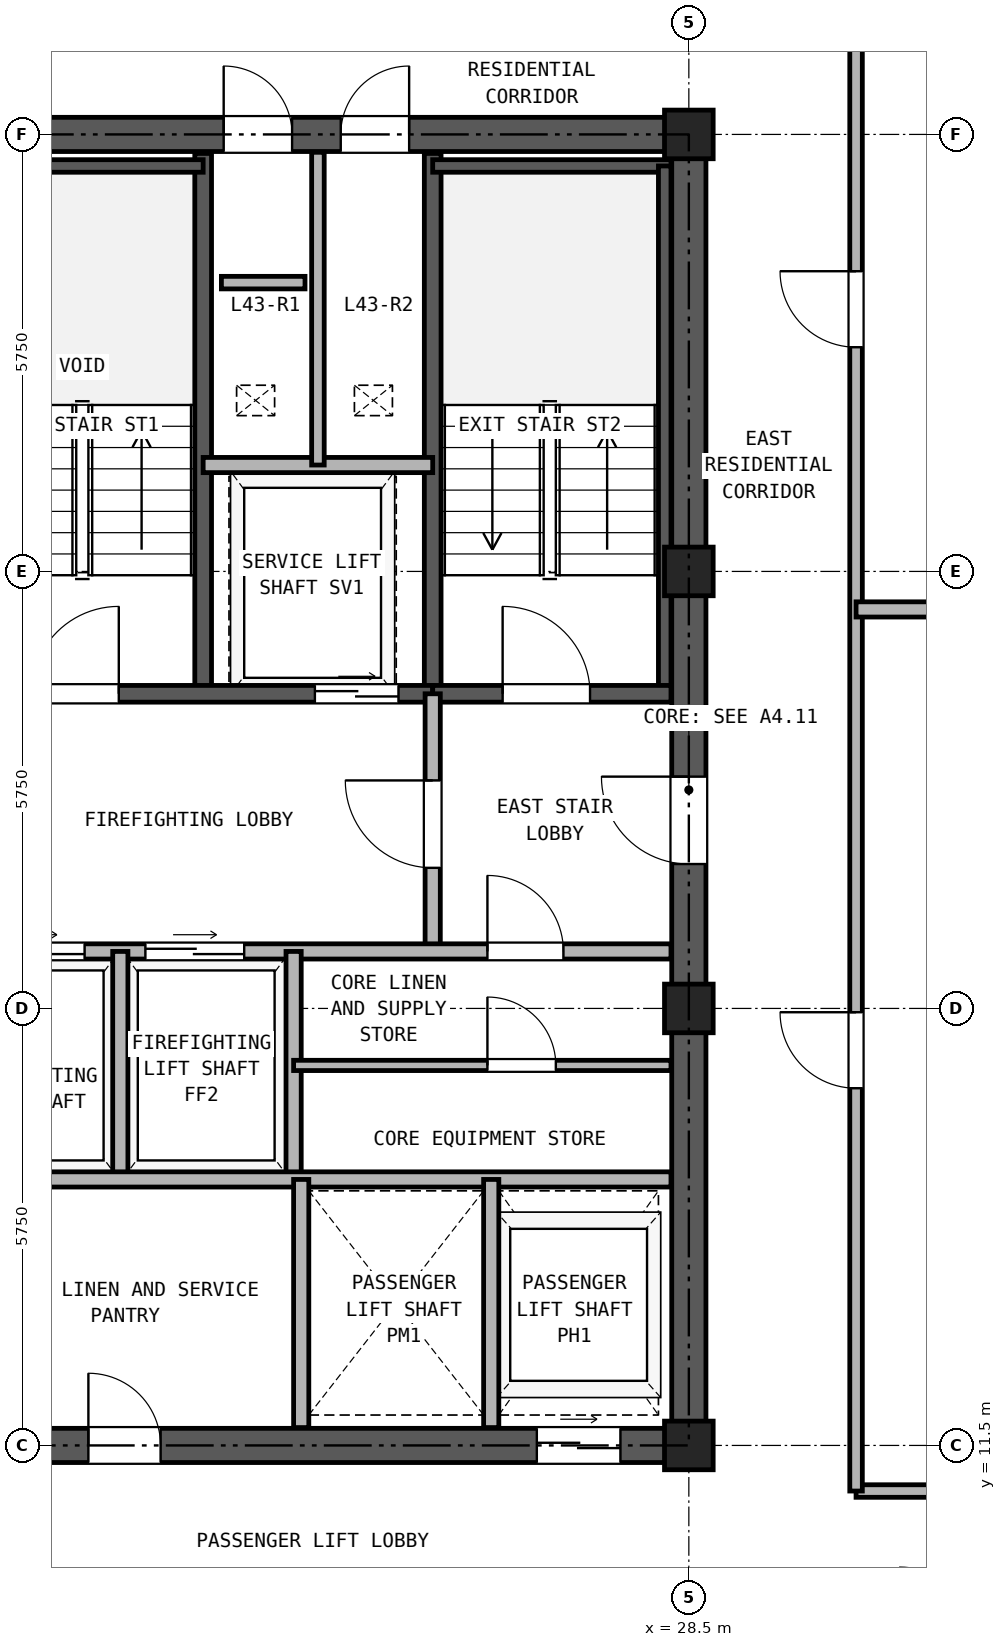
"""IFC4 building model, lengths in metres.
Left out: names, types, materials, properties, quantities, classifications, styles, units other than length and angle.
Written with IfcOpenShell. Run it as: python <this file> out.ifc"""

import sys

from ifc_helpers import new_model, si_unit, direction, frame, frame_2d, origin, origin_2d, place, context, subcontext, project, spatial, rectangle, hollow_rectangle, extrude, source, transform, mapped, element, fill, save


model = new_model("IFC4")
c1 = context("Model", 3, precision=1e-05, world=origin(), true_north=direction((0.0, 1.0)))
c2 = subcontext(c1, "Body", "Model", "MODEL_VIEW")
j1 = project(units=[si_unit("LENGTHUNIT", "METRE"), si_unit("PLANEANGLEUNIT", "RADIAN")], contexts=[c1])
p1 = place(None, origin())
s1 = spatial("IfcSite", under=j1, at=p1, CompositionType="ELEMENT")
p2 = place(p1, origin())
s2 = spatial("IfcBuilding", under=s1, at=p2, CompositionType="ELEMENT")
p3 = place(p2, frame((0.0, 0.0, 156.1)))
s3 = spatial("IfcBuildingStorey", under=s2, at=p3, CompositionType="ELEMENT", Elevation=156.1)
m1 = source(origin(), c2, "Body", "SweptSolid", [
    extrude(hollow_rectangle(XDim=0.64, YDim=0.64, WallThickness=0.035, at=origin_2d()), origin(), (0.0, 0.0, 1.0), 2.95),
])
for number, where, z_axis, x_axis in (
    (1, (28.5, 11.5, 0.0), (0.0, 0.0, 1.0), (1.0, 0.0, 0.0)),
    (2, (28.5, 17.25, 0.0), (0.0, 0.0, 1.0), (1.0, 0.0, 0.0)),
    (3, (28.5, 23.0, 0.0), (0.0, 0.0, 1.0), (1.0, 0.0, 0.0)),
    (4, (28.5, 28.75, 0.0), (0.0, 0.0, 1.0), (1.0, 0.0, 0.0)),
):
    element("IfcColumn", number, at=place(p3, frame(where, z_axis=z_axis, x_axis=x_axis)), inside=s3, PredefinedType="COLUMN", context=c2, shape_type="MappedRepresentation", body=[
        mapped(m1, transform((0.0, 0.0, 0.0), x_axis=(1.0, 0.0, 0.0), y_axis=(0.0, 1.0, 0.0), z_axis=(0.0, 0.0, 1.0), scale=1.0)),
    ])
p4 = place(p3, frame((18.275, 11.5, 0.0), z_axis=(0.0, 0.0, 1.0), x_axis=(1.0, 0.0, 0.0)))
e5 = element("IfcWall", 5, at=p4, inside=s3, PredefinedType="SHEAR", context=c2, shape_type="SweptSolid", body=[
    extrude(rectangle(XDim=10.45, YDim=0.45, at=frame_2d((5.225, 0.0))), origin(), (0.0, 0.0, 1.0), 2.95),
])
p5 = place(p4, frame((2.325, 0.0, 0.0)))
e6 = element("IfcOpeningElement", 6, at=p5, cuts=e5, PredefinedType="OPENING", context=c2, shape_type="SweptSolid", body=[
    extrude(rectangle(XDim=0.95, YDim=2.15, at=frame_2d((0.475, 1.075))), frame((0.0, 0.235, 0.0), z_axis=(0.0, -1.0, 0.0), x_axis=(1.0, 0.0, 0.0)), (0.0, 0.0, 1.0), 0.47),
])
p6 = place(p4, frame((8.225, 0.0, 0.0)))
e7 = element("IfcOpeningElement", 7, at=p6, cuts=e5, PredefinedType="OPENING", context=c2, shape_type="SweptSolid", body=[
    extrude(rectangle(XDim=1.1, YDim=2.25, at=frame_2d((0.55, 1.125))), frame((0.0, 0.235, 0.0), z_axis=(0.0, -1.0, 0.0), x_axis=(1.0, 0.0, 0.0)), (0.0, 0.0, 1.0), 0.47),
])
p7 = place(p3, frame((18.275, 28.75, 0.0), z_axis=(0.0, 0.0, 1.0), x_axis=(1.0, 0.0, 0.0)))
e8 = element("IfcWall", 8, at=p7, inside=s3, PredefinedType="SHEAR", context=c2, shape_type="SweptSolid", body=[
    extrude(rectangle(XDim=10.45, YDim=0.45, at=frame_2d((5.225, 0.0))), origin(), (0.0, 0.0, 1.0), 2.95),
])
p8 = place(p7, frame((4.105, 0.0, 0.0)))
e9 = element("IfcOpeningElement", 9, at=p8, cuts=e8, PredefinedType="OPENING", context=c2, shape_type="SweptSolid", body=[
    extrude(rectangle(XDim=0.9, YDim=2.05, at=frame_2d((0.45, 1.025))), frame((0.0, 0.235, 0.0), z_axis=(0.0, -1.0, 0.0), x_axis=(1.0, 0.0, 0.0)), (0.0, 0.0, 1.0), 0.47),
])
p9 = place(p7, frame((5.645, 0.0, 0.0)))
e10 = element("IfcOpeningElement", 10, at=p9, cuts=e8, PredefinedType="OPENING", context=c2, shape_type="SweptSolid", body=[
    extrude(rectangle(XDim=0.9, YDim=2.05, at=frame_2d((0.45, 1.025))), frame((0.0, 0.235, 0.0), z_axis=(0.0, -1.0, 0.0), x_axis=(1.0, 0.0, 0.0)), (0.0, 0.0, 1.0), 0.47),
])
p10 = place(p3, frame((28.5, 11.725, 0.0), z_axis=(0.0, 0.0, 1.0), x_axis=(0.0, 1.0, 0.0)))
e11 = element("IfcWall", 11, at=p10, inside=s3, PredefinedType="SHEAR", context=c2, shape_type="SweptSolid", body=[
    extrude(rectangle(XDim=16.8, YDim=0.45, at=frame_2d((8.4, 0.0))), origin(), (0.0, 0.0, 1.0), 2.95),
])
p11 = place(p10, frame((7.425, 0.0, 0.0)))
e12 = element("IfcOpeningElement", 12, at=p11, cuts=e11, PredefinedType="OPENING", context=c2, shape_type="SweptSolid", body=[
    extrude(rectangle(XDim=1.15, YDim=2.2, at=frame_2d((0.575, 1.1))), frame((0.0, 0.235, 0.0), z_axis=(0.0, -1.0, 0.0), x_axis=(1.0, 0.0, 0.0)), (0.0, 0.0, 1.0), 0.47),
])
for number, where, z_axis, x_axis in (
    (13, (22.11, 21.39, 0.0), (0.0, 0.0, 1.0), (0.0, 1.0, 0.0)),
    (14, (25.13, 21.39, 0.0), (0.0, 0.0, 1.0), (0.0, 1.0, 0.0)),
):
    element("IfcWall", number, at=place(p3, frame(where, z_axis=z_axis, x_axis=x_axis)), inside=s3, PredefinedType="SOLIDWALL", context=c2, shape_type="SweptSolid", body=[
        extrude(rectangle(XDim=7.11, YDim=0.22, at=frame_2d((3.555, 0.0))), origin(), (0.0, 0.0, 1.0), 2.95),
    ])
p12 = place(p3, frame((18.735, 28.335, 0.0), z_axis=(0.0, 0.0, 1.0), x_axis=(1.0, 0.0, 0.0)))
e15 = element("IfcWall", 15, at=p12, inside=s3, PredefinedType="PARTITIONING", context=c2, shape_type="SweptSolid", body=[
    extrude(rectangle(XDim=3.375, YDim=0.165, at=frame_2d((1.688, 0.0))), origin(), (0.0, 0.0, 1.0), 2.95),
])
p13 = place(p3, frame((25.13, 28.335, 0.0), z_axis=(0.0, 0.0, 1.0), x_axis=(1.0, 0.0, 0.0)))
e16 = element("IfcWall", 16, at=p13, inside=s3, PredefinedType="PARTITIONING", context=c2, shape_type="SweptSolid", body=[
    extrude(rectangle(XDim=3.135, YDim=0.165, at=frame_2d((1.567, 0.0))), origin(), (0.0, 0.0, 1.0), 2.95),
])
p14 = place(p3, frame((28.183, 21.39, 0.0), z_axis=(0.0, 0.0, 1.0), x_axis=(0.0, 1.0, 0.0)))
e17 = element("IfcWall", 17, at=p14, inside=s3, PredefinedType="PARTITIONING", context=c2, shape_type="SweptSolid", body=[
    extrude(rectangle(XDim=6.945, YDim=0.165, at=frame_2d((3.473, 0.0))), origin(), (0.0, 0.0, 1.0), 2.95),
])
p15 = place(p3, frame((18.735, 21.39, 0.0), z_axis=(0.0, 0.0, 1.0), x_axis=(1.0, 0.0, 0.0)))
e18 = element("IfcWall", 18, at=p15, inside=s3, PredefinedType="SOLIDWALL", context=c2, shape_type="SweptSolid", body=[
    extrude(rectangle(XDim=6.395, YDim=0.22, at=frame_2d((3.197, 0.0))), origin(), (0.0, 0.0, 1.0), 2.95),
])
p16 = place(p15, frame((1.115, 0.0, 0.0)))
e19 = element("IfcOpeningElement", 19, at=p16, cuts=e18, PredefinedType="OPENING", context=c2, shape_type="SweptSolid", body=[
    extrude(rectangle(XDim=1.15, YDim=2.2, at=frame_2d((0.575, 1.1))), frame((0.0, 0.12, 0.0), z_axis=(0.0, -1.0, 0.0), x_axis=(1.0, 0.0, 0.0)), (0.0, 0.0, 1.0), 0.24),
])
p17 = place(p15, frame((4.845, 0.0, 0.0)))
e20 = element("IfcOpeningElement", 20, at=p17, cuts=e18, PredefinedType="OPENING", context=c2, shape_type="SweptSolid", body=[
    extrude(rectangle(XDim=1.1, YDim=2.25, at=frame_2d((0.55, 1.125))), frame((0.0, 0.12, 0.0), z_axis=(0.0, -1.0, 0.0), x_axis=(1.0, 0.0, 0.0)), (0.0, 0.0, 1.0), 0.24),
])
p18 = place(p3, frame((25.13, 21.39, 0.0), z_axis=(0.0, 0.0, 1.0), x_axis=(1.0, 0.0, 0.0)))
e21 = element("IfcWall", 21, at=p18, inside=s3, PredefinedType="SOLIDWALL", context=c2, shape_type="SweptSolid", body=[
    extrude(rectangle(XDim=3.135, YDim=0.22, at=frame_2d((1.567, 0.0))), origin(), (0.0, 0.0, 1.0), 2.95),
])
p19 = place(p18, frame((0.92, 0.0, 0.0)))
e22 = element("IfcOpeningElement", 22, at=p19, cuts=e21, PredefinedType="OPENING", context=c2, shape_type="SweptSolid", body=[
    extrude(rectangle(XDim=1.15, YDim=2.2, at=frame_2d((0.575, 1.1))), frame((0.0, 0.12, 0.0), z_axis=(0.0, -1.0, 0.0), x_axis=(1.0, 0.0, 0.0)), (0.0, 0.0, 1.0), 0.24),
])
p20 = place(p3, frame((22.11, 24.4, 0.0), z_axis=(0.0, 0.0, 1.0), x_axis=(1.0, 0.0, 0.0)))
e23 = element("IfcWall", 23, at=p20, inside=s3, PredefinedType="PARTITIONING", context=c2, shape_type="SweptSolid", body=[
    extrude(rectangle(XDim=3.02, YDim=0.2, at=frame_2d((1.51, 0.0))), origin(), (0.0, 0.0, 1.0), 2.95),
])
p21 = place(p3, frame((23.62, 24.4, 0.0), z_axis=(0.0, 0.0, 1.0), x_axis=(0.0, 1.0, 0.0)))
e24 = element("IfcWall", 24, at=p21, inside=s3, PredefinedType="PARTITIONING", context=c2, shape_type="SweptSolid", body=[
    extrude(rectangle(XDim=4.115, YDim=0.165, at=frame_2d((2.058, 0.0))), origin(), (0.0, 0.0, 1.0), 2.95),
])
p22 = place(p3, frame((25.13, 18.0, 0.0), z_axis=(0.0, 0.0, 1.0), x_axis=(0.0, 1.0, 0.0)))
e25 = element("IfcWall", 25, at=p22, inside=s3, PredefinedType="PARTITIONING", context=c2, shape_type="SweptSolid", body=[
    extrude(rectangle(XDim=3.39, YDim=0.2, at=frame_2d((1.695, 0.0))), origin(), (0.0, 0.0, 1.0), 2.95),
])
p23 = place(p22, frame((1.1, 0.0, 0.0)))
e26 = element("IfcOpeningElement", 26, at=p23, cuts=e25, PredefinedType="OPENING", context=c2, shape_type="SweptSolid", body=[
    extrude(rectangle(XDim=1.15, YDim=2.2, at=frame_2d((0.575, 1.1))), frame((0.0, 0.11, 0.0), z_axis=(0.0, -1.0, 0.0), x_axis=(1.0, 0.0, 0.0)), (0.0, 0.0, 1.0), 0.22),
])
p24 = place(p3, frame((18.735, 18.0, 0.0), z_axis=(0.0, 0.0, 1.0), x_axis=(1.0, 0.0, 0.0)))
e27 = element("IfcWall", 27, at=p24, inside=s3, PredefinedType="PARTITIONING", context=c2, shape_type="SweptSolid", body=[
    extrude(rectangle(XDim=9.53, YDim=0.2, at=frame_2d((4.765, 0.0))), origin(), (0.0, 0.0, 1.0), 2.95),
])
p25 = place(p24, frame((0.515, 0.0, 0.0)))
e28 = element("IfcOpeningElement", 28, at=p25, cuts=e27, PredefinedType="OPENING", context=c2, shape_type="SweptSolid", body=[
    extrude(rectangle(XDim=1.3, YDim=2.3, at=frame_2d((0.65, 1.15))), frame((0.0, 0.11, 0.0), z_axis=(0.0, -1.0, 0.0), x_axis=(1.0, 0.0, 0.0)), (0.0, 0.0, 1.0), 0.22),
])
p26 = place(p24, frame((2.615, 0.0, 0.0)))
e29 = element("IfcOpeningElement", 29, at=p26, cuts=e27, PredefinedType="OPENING", context=c2, shape_type="SweptSolid", body=[
    extrude(rectangle(XDim=1.3, YDim=2.3, at=frame_2d((0.65, 1.15))), frame((0.0, 0.11, 0.0), z_axis=(0.0, -1.0, 0.0), x_axis=(1.0, 0.0, 0.0)), (0.0, 0.0, 1.0), 0.22),
])
p27 = place(p24, frame((7.115, 0.0, 0.0)))
e30 = element("IfcOpeningElement", 30, at=p27, cuts=e27, PredefinedType="OPENING", context=c2, shape_type="SweptSolid", body=[
    extrude(rectangle(XDim=1.0, YDim=2.15, at=frame_2d((0.5, 1.075))), frame((0.0, 0.11, 0.0), z_axis=(0.0, -1.0, 0.0), x_axis=(1.0, 0.0, 0.0)), (0.0, 0.0, 1.0), 0.22),
])
for number, where, z_axis, x_axis in (
    (31, (21.02, 15.0, 0.0), (0.0, 0.0, 1.0), (0.0, 1.0, 0.0)),
    (32, (23.3, 15.0, 0.0), (0.0, 0.0, 1.0), (0.0, 1.0, 0.0)),
):
    element("IfcWall", number, at=place(p3, frame(where, z_axis=z_axis, x_axis=x_axis)), inside=s3, PredefinedType="PARTITIONING", context=c2, shape_type="SweptSolid", body=[
        extrude(rectangle(XDim=3.0, YDim=0.2, at=frame_2d((1.5, 0.0))), origin(), (0.0, 0.0, 1.0), 2.95),
    ])
p28 = place(p3, frame((18.735, 15.0, 0.0), z_axis=(0.0, 0.0, 1.0), x_axis=(1.0, 0.0, 0.0)))
e33 = element("IfcWall", 33, at=p28, inside=s3, PredefinedType="PARTITIONING", context=c2, shape_type="SweptSolid", body=[
    extrude(rectangle(XDim=9.53, YDim=0.2, at=frame_2d((4.765, 0.0))), origin(), (0.0, 0.0, 1.0), 2.95),
])
p29 = place(p3, frame((23.3, 16.5, 0.0), z_axis=(0.0, 0.0, 1.0), x_axis=(1.0, 0.0, 0.0)))
e34 = element("IfcWall", 34, at=p29, inside=s3, PredefinedType="PARTITIONING", context=c2, shape_type="SweptSolid", body=[
    extrude(rectangle(XDim=4.965, YDim=0.135, at=frame_2d((2.482, 0.0))), origin(), (0.0, 0.0, 1.0), 2.95),
])
p30 = place(p29, frame((2.55, 0.0, 0.0)))
e35 = element("IfcOpeningElement", 35, at=p30, cuts=e34, PredefinedType="OPENING", context=c2, shape_type="SweptSolid", body=[
    extrude(rectangle(XDim=0.9, YDim=2.05, at=frame_2d((0.45, 1.025))), frame((0.0, 0.077, 0.0), z_axis=(0.0, -1.0, 0.0), x_axis=(1.0, 0.0, 0.0)), (0.0, 0.0, 1.0), 0.155),
])
for number, where, z_axis, x_axis in (
    (36, (23.4, 11.735, 0.0), (0.0, 0.0, 1.0), (0.0, 1.0, 0.0)),
    (37, (25.9, 11.735, 0.0), (0.0, 0.0, 1.0), (0.0, 1.0, 0.0)),
):
    element("IfcWall", number, at=place(p3, frame(where, z_axis=z_axis, x_axis=x_axis)), inside=s3, PredefinedType="PARTITIONING", context=c2, shape_type="SweptSolid", body=[
        extrude(rectangle(XDim=3.265, YDim=0.2, at=frame_2d((1.632, 0.0))), origin(), (0.0, 0.0, 1.0), 2.95),
    ])
p31 = place(p3, frame((30.7, 10.9, 0.0), z_axis=(0.0, 0.0, 1.0), x_axis=(1.0, 0.0, 0.0)))
e38 = element("IfcWall", 38, at=p31, inside=s3, PredefinedType="PARTITIONING", context=c2, shape_type="SweptSolid", body=[
    extrude(rectangle(XDim=7.5, YDim=0.165, at=frame_2d((3.75, 0.0))), origin(), (0.0, 0.0, 1.0), 2.95),
])
p32 = place(p3, frame((30.7, 10.9, 0.0), z_axis=(0.0, 0.0, 1.0), x_axis=(0.0, 1.0, 0.0)))
e39 = element("IfcWall", 39, at=p32, inside=s3, PredefinedType="PARTITIONING", context=c2, shape_type="SweptSolid", body=[
    extrude(rectangle(XDim=24.24, YDim=0.165, at=frame_2d((12.12, 0.0))), origin(), (0.0, 0.0, 1.0), 2.95),
])
p33 = place(p32, frame((5.3, 0.0, 0.0)))
e40 = element("IfcOpeningElement", 40, at=p33, cuts=e39, PredefinedType="OPENING", context=c2, shape_type="SweptSolid", body=[
    extrude(rectangle(XDim=1.0, YDim=2.15, at=frame_2d((0.5, 1.075))), frame((0.0, 0.093, 0.0), z_axis=(0.0, -1.0, 0.0), x_axis=(1.0, 0.0, 0.0)), (0.0, 0.0, 1.0), 0.185),
])
p34 = place(p32, frame((15.05, 0.0, 0.0)))
e41 = element("IfcOpeningElement", 41, at=p34, cuts=e39, PredefinedType="OPENING", context=c2, shape_type="SweptSolid", body=[
    extrude(rectangle(XDim=1.0, YDim=2.15, at=frame_2d((0.5, 1.075))), frame((0.0, 0.093, 0.0), z_axis=(0.0, -1.0, 0.0), x_axis=(1.0, 0.0, 0.0)), (0.0, 0.0, 1.0), 0.185),
])
p35 = place(p3, frame((30.7, 22.5, 0.0), z_axis=(0.0, 0.0, 1.0), x_axis=(1.0, 0.0, 0.0)))
e42 = element("IfcWall", 42, at=p35, inside=s3, PredefinedType="PARTITIONING", context=c2, shape_type="SweptSolid", body=[
    extrude(rectangle(XDim=10.94, YDim=0.2, at=frame_2d((5.47, 0.0))), origin(), (0.0, 0.0, 1.0), 2.95),
])
p36 = place(p3, frame((22.35, 26.8, 0.0), z_axis=(0.0, 0.0, 1.0), x_axis=(1.0, 0.0, 0.0)))
e43 = element("IfcWall", 43, at=p36, inside=s3, PredefinedType="PARTITIONING", context=c2, shape_type="SweptSolid", body=[
    extrude(rectangle(XDim=1.1, YDim=0.165, at=frame_2d((0.55, 0.0))), origin(), (0.0, 0.0, 1.0), 2.95),
])
p37 = place(p16, frame((1.15, 0.0, 0.0), z_axis=(0.0, 0.0, 1.0), x_axis=(-1.0, 0.0, 0.0)))
e44 = element("IfcDoor", 44, at=p37, inside=s3, OperationType="SINGLE_SWING_RIGHT", PredefinedType="DOOR", context=c2, shape_type="SweptSolid", body=[
    extrude(rectangle(XDim=1.15, YDim=2.2, at=frame_2d((0.575, 1.1))), frame((0.0, 0.025, 0.0), z_axis=(0.0, -1.0, 0.0), x_axis=(1.0, 0.0, 0.0)), (0.0, 0.0, 1.0), 0.05),
])
fill(e19, e44)
p38 = place(p19, frame((1.15, 0.0, 0.0), z_axis=(0.0, 0.0, 1.0), x_axis=(-1.0, 0.0, 0.0)))
e45 = element("IfcDoor", 45, at=p38, inside=s3, OperationType="SINGLE_SWING_LEFT", PredefinedType="DOOR", context=c2, shape_type="SweptSolid", body=[
    extrude(rectangle(XDim=1.15, YDim=2.2, at=frame_2d((0.575, 1.1))), frame((0.0, 0.025, 0.0), z_axis=(0.0, -1.0, 0.0), x_axis=(1.0, 0.0, 0.0)), (0.0, 0.0, 1.0), 0.05),
])
fill(e22, e45)
p39 = place(p17, frame((1.1, 0.0, 0.0), z_axis=(0.0, 0.0, 1.0), x_axis=(-1.0, 0.0, 0.0)))
e46 = element("IfcDoor", 46, at=p39, inside=s3, OperationType="DOUBLE_DOOR_SLIDING", PredefinedType="DOOR", context=c2, shape_type="SweptSolid", body=[
    extrude(rectangle(XDim=1.1, YDim=2.25, at=frame_2d((0.55, 1.125))), frame((0.0, 0.025, 0.0), z_axis=(0.0, -1.0, 0.0), x_axis=(1.0, 0.0, 0.0)), (0.0, 0.0, 1.0), 0.05),
])
fill(e20, e46)
p40 = place(p23, origin())
e47 = element("IfcDoor", 47, at=p40, inside=s3, OperationType="SINGLE_SWING_RIGHT", PredefinedType="DOOR", context=c2, shape_type="SweptSolid", body=[
    extrude(rectangle(XDim=1.15, YDim=2.2, at=frame_2d((0.575, 1.1))), frame((0.0, 0.025, 0.0), z_axis=(0.0, -1.0, 0.0), x_axis=(1.0, 0.0, 0.0)), (0.0, 0.0, 1.0), 0.05),
])
fill(e26, e47)
p41 = place(p25, origin())
e48 = element("IfcDoor", 48, at=p41, inside=s3, OperationType="DOUBLE_DOOR_SLIDING", PredefinedType="DOOR", context=c2, shape_type="SweptSolid", body=[
    extrude(rectangle(XDim=1.3, YDim=2.3, at=frame_2d((0.65, 1.15))), frame((0.0, 0.025, 0.0), z_axis=(0.0, -1.0, 0.0), x_axis=(1.0, 0.0, 0.0)), (0.0, 0.0, 1.0), 0.05),
])
fill(e28, e48)
p42 = place(p26, origin())
e49 = element("IfcDoor", 49, at=p42, inside=s3, OperationType="DOUBLE_DOOR_SLIDING", PredefinedType="DOOR", context=c2, shape_type="SweptSolid", body=[
    extrude(rectangle(XDim=1.3, YDim=2.3, at=frame_2d((0.65, 1.15))), frame((0.0, 0.025, 0.0), z_axis=(0.0, -1.0, 0.0), x_axis=(1.0, 0.0, 0.0)), (0.0, 0.0, 1.0), 0.05),
])
fill(e29, e49)
p43 = place(p27, frame((1.0, 0.0, 0.0), z_axis=(0.0, 0.0, 1.0), x_axis=(-1.0, 0.0, 0.0)))
e50 = element("IfcDoor", 50, at=p43, inside=s3, OperationType="SINGLE_SWING_LEFT", PredefinedType="DOOR", context=c2, shape_type="SweptSolid", body=[
    extrude(rectangle(XDim=1.0, YDim=2.15, at=frame_2d((0.5, 1.075))), frame((0.0, 0.025, 0.0), z_axis=(0.0, -1.0, 0.0), x_axis=(1.0, 0.0, 0.0)), (0.0, 0.0, 1.0), 0.05),
])
fill(e30, e50)
p44 = place(p30, frame((0.9, 0.0, 0.0), z_axis=(0.0, 0.0, 1.0), x_axis=(-1.0, 0.0, 0.0)))
e51 = element("IfcDoor", 51, at=p44, inside=s3, OperationType="SINGLE_SWING_LEFT", PredefinedType="DOOR", context=c2, shape_type="SweptSolid", body=[
    extrude(rectangle(XDim=0.9, YDim=2.05, at=frame_2d((0.45, 1.025))), frame((0.0, 0.025, 0.0), z_axis=(0.0, -1.0, 0.0), x_axis=(1.0, 0.0, 0.0)), (0.0, 0.0, 1.0), 0.05),
])
fill(e35, e51)
p45 = place(p11, origin())
e52 = element("IfcDoor", 52, at=p45, inside=s3, OperationType="SINGLE_SWING_RIGHT", PredefinedType="DOOR", context=c2, shape_type="SweptSolid", body=[
    extrude(rectangle(XDim=1.15, YDim=2.2, at=frame_2d((0.575, 1.1))), frame((0.0, 0.025, 0.0), z_axis=(0.0, -1.0, 0.0), x_axis=(1.0, 0.0, 0.0)), (0.0, 0.0, 1.0), 0.05),
])
fill(e12, e52)
p46 = place(p8, origin())
e53 = element("IfcDoor", 53, at=p46, inside=s3, OperationType="SINGLE_SWING_LEFT", PredefinedType="DOOR", context=c2, shape_type="SweptSolid", body=[
    extrude(rectangle(XDim=0.9, YDim=2.05, at=frame_2d((0.45, 1.025))), frame((0.0, 0.025, 0.0), z_axis=(0.0, -1.0, 0.0), x_axis=(1.0, 0.0, 0.0)), (0.0, 0.0, 1.0), 0.05),
])
fill(e9, e53)
p47 = place(p9, origin())
e54 = element("IfcDoor", 54, at=p47, inside=s3, OperationType="SINGLE_SWING_RIGHT", PredefinedType="DOOR", context=c2, shape_type="SweptSolid", body=[
    extrude(rectangle(XDim=0.9, YDim=2.05, at=frame_2d((0.45, 1.025))), frame((0.0, 0.025, 0.0), z_axis=(0.0, -1.0, 0.0), x_axis=(1.0, 0.0, 0.0)), (0.0, 0.0, 1.0), 0.05),
])
fill(e10, e54)
p48 = place(p5, frame((0.95, 0.0, 0.0), z_axis=(0.0, 0.0, 1.0), x_axis=(-1.0, 0.0, 0.0)))
e55 = element("IfcDoor", 55, at=p48, inside=s3, OperationType="SINGLE_SWING_LEFT", PredefinedType="DOOR", context=c2, shape_type="SweptSolid", body=[
    extrude(rectangle(XDim=0.95, YDim=2.15, at=frame_2d((0.475, 1.075))), frame((0.0, 0.025, 0.0), z_axis=(0.0, -1.0, 0.0), x_axis=(1.0, 0.0, 0.0)), (0.0, 0.0, 1.0), 0.05),
])
fill(e6, e55)
p49 = place(p6, frame((1.1, 0.0, 0.0), z_axis=(0.0, 0.0, 1.0), x_axis=(-1.0, 0.0, 0.0)))
e56 = element("IfcDoor", 56, at=p49, inside=s3, OperationType="DOUBLE_DOOR_SLIDING", PredefinedType="DOOR", context=c2, shape_type="SweptSolid", body=[
    extrude(rectangle(XDim=1.1, YDim=2.25, at=frame_2d((0.55, 1.125))), frame((0.0, 0.025, 0.0), z_axis=(0.0, -1.0, 0.0), x_axis=(1.0, 0.0, 0.0)), (0.0, 0.0, 1.0), 0.05),
])
fill(e7, e56)
p50 = place(p33, frame((1.0, 0.0, 0.0), z_axis=(0.0, 0.0, 1.0), x_axis=(-1.0, 0.0, 0.0)))
e57 = element("IfcDoor", 57, at=p50, inside=s3, OperationType="SINGLE_SWING_RIGHT", PredefinedType="DOOR", context=c2, shape_type="SweptSolid", body=[
    extrude(rectangle(XDim=1.0, YDim=2.15, at=frame_2d((0.5, 1.075))), frame((0.0, 0.025, 0.0), z_axis=(0.0, -1.0, 0.0), x_axis=(1.0, 0.0, 0.0)), (0.0, 0.0, 1.0), 0.05),
])
fill(e40, e57)
p51 = place(p34, frame((1.0, 0.0, 0.0), z_axis=(0.0, 0.0, 1.0), x_axis=(-1.0, 0.0, 0.0)))
e58 = element("IfcDoor", 58, at=p51, inside=s3, OperationType="SINGLE_SWING_RIGHT", PredefinedType="DOOR", context=c2, shape_type="SweptSolid", body=[
    extrude(rectangle(XDim=1.0, YDim=2.15, at=frame_2d((0.5, 1.075))), frame((0.0, 0.025, 0.0), z_axis=(0.0, -1.0, 0.0), x_axis=(1.0, 0.0, 0.0)), (0.0, 0.0, 1.0), 0.05),
])
fill(e41, e58)
save(model, sys.argv[1])
